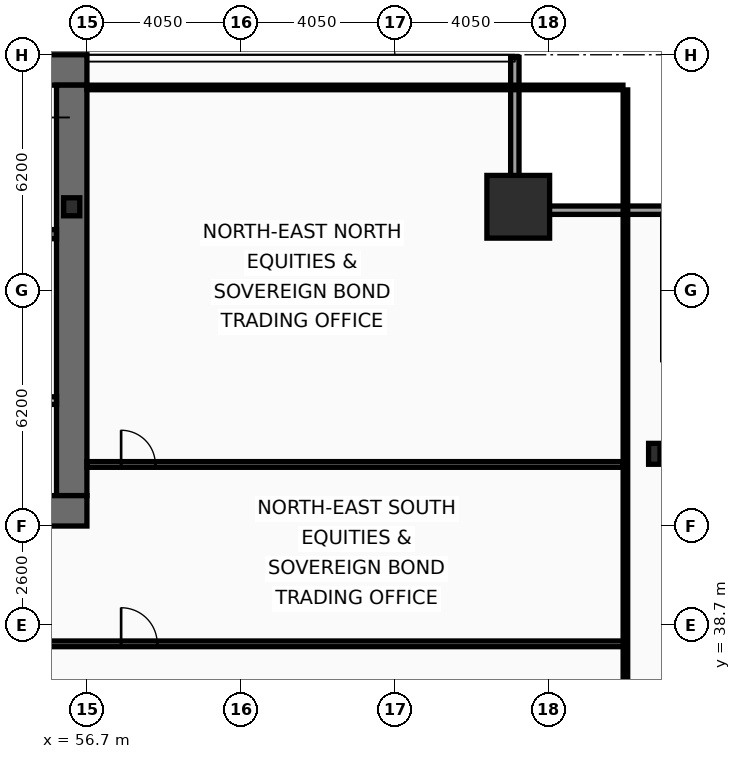
"""IFC4 building model, lengths in metres.
Left out: names, types, materials, properties, quantities, classifications, styles, units other than length and angle.
Written with IfcOpenShell. Run it as: python <this file> out.ifc"""

import sys

from ifc_helpers import new_model, si_unit, direction, frame, frame_2d, origin, origin_2d, place, context, subcontext, project, spatial, rectangle, hollow_rectangle, i_section, extrude, element, fill, save


model = new_model("IFC4")
c1 = context("Model", 3, precision=1e-05, world=origin(), true_north=direction((0.0, 1.0)))
c2 = subcontext(c1, "Body", "Model", "MODEL_VIEW")
j1 = project(units=[si_unit("LENGTHUNIT", "METRE"), si_unit("PLANEANGLEUNIT", "RADIAN")], contexts=[c1])
p1 = place(None, origin())
s1 = spatial("IfcSite", under=j1, at=p1, CompositionType="ELEMENT")
p2 = place(p1, origin())
s2 = spatial("IfcBuilding", under=s1, at=p2, CompositionType="ELEMENT")
p3 = place(p2, frame((0.0, 0.0, 33.8)))
s3 = spatial("IfcBuildingStorey", under=s2, at=p3, CompositionType="ELEMENT", Elevation=33.8)
p4 = place(p3, frame((16.2, 53.3, 0.0), z_axis=(0.0, 0.0, 1.0), x_axis=(1.0, 0.0, 0.0)))
e1 = element("IfcWall", 1, at=p4, inside=s3, PredefinedType="SHEAR", context=c2, shape_type="SweptSolid", body=[
    extrude(rectangle(XDim=40.5, YDim=0.8, at=frame_2d((20.25, 0.0))), origin(), (0.0, 0.0, 1.0), 3.82),
])
p5 = place(p3, frame((56.3, 52.9, 0.0), z_axis=(0.0, 0.0, 1.0), x_axis=(0.0, -1.0, 0.0)))
e2 = element("IfcWall", 2, at=p5, inside=s3, PredefinedType="SHEAR", context=c2, shape_type="SweptSolid", body=[
    extrude(rectangle(XDim=10.8, YDim=0.8, at=frame_2d((5.4, 0.0))), origin(), (0.0, 0.0, 1.0), 3.82),
])
p6 = place(p3, frame((56.7, 41.7, 0.0), z_axis=(0.0, 0.0, 1.0), x_axis=(-1.0, 0.0, 0.0)))
e3 = element("IfcWall", 3, at=p6, inside=s3, PredefinedType="SHEAR", context=c2, shape_type="SweptSolid", body=[
    extrude(rectangle(XDim=2.45, YDim=0.8, at=frame_2d((1.225, 0.0))), origin(), (0.0, 0.0, 1.0), 3.82),
])
p7 = place(p3, frame((48.63, 48.98, 0.0), z_axis=(0.0, 0.0, 1.0), x_axis=(1.0, 0.0, 0.0)))
e4 = element("IfcWall", 4, at=p7, inside=s3, PredefinedType="SHEAR", context=c2, shape_type="SweptSolid", body=[
    extrude(rectangle(XDim=7.27, YDim=0.24, at=frame_2d((3.635, 0.0))), origin(), (0.0, 0.0, 1.0), 3.82),
])
p8 = place(p7, frame((6.0, 0.0, 0.0)))
e5 = element("IfcOpeningElement", 5, at=p8, cuts=e4, PredefinedType="OPENING", context=c2, shape_type="SweptSolid", body=[
    extrude(rectangle(XDim=1.05, YDim=2.15, at=frame_2d((0.525, 1.075))), frame((0.0, 0.13, 0.0), z_axis=(0.0, -1.0, 0.0), x_axis=(1.0, 0.0, 0.0)), (0.0, 0.0, 1.0), 0.26),
])
p9 = place(p3, frame((68.05, 49.7, 0.0), z_axis=(0.0, 0.0, 1.0), x_axis=(1.0, 0.0, 0.0)))
e6 = element("IfcColumn", 6, at=p9, inside=s3, PredefinedType="COLUMN", context=c2, shape_type="SweptSolid", body=[
    extrude(hollow_rectangle(XDim=1.65, YDim=1.65, WallThickness=0.075, at=origin_2d()), origin(), (0.0, 0.0, 1.0), 4.0),
])
p10 = place(p3, frame((71.63, 43.2, 0.0), z_axis=(0.0, 0.0, 1.0), x_axis=(1.0, 0.0, 0.0)))
e7 = element("IfcColumn", 7, at=p10, inside=s3, PredefinedType="COLUMN", context=c2, shape_type="SweptSolid", body=[
    extrude(i_section(OverallWidth=0.3, OverallDepth=0.55, WebThickness=0.015, FlangeThickness=0.029, at=origin_2d()), origin(), (0.0, 0.0, 1.0), 4.0),
])
p11 = place(p3, frame((56.3, 49.7, 0.0), z_axis=(0.0, 0.0, 1.0), x_axis=(1.0, 0.0, 0.0)))
e8 = element("IfcColumn", 8, at=p11, inside=s3, PredefinedType="COLUMN", context=c2, shape_type="SweptSolid", body=[
    extrude(i_section(OverallWidth=0.424, OverallDepth=0.474, WebThickness=0.048, FlangeThickness=0.077, at=origin_2d()), origin(), (0.0, 0.0, 1.0), 4.0),
])
p12 = place(p3, frame((67.96, 53.63, 0.0), z_axis=(0.0, 0.0, 1.0), x_axis=(0.0, -1.0, 0.0)))
e9 = element("IfcWall", 9, at=p12, inside=s3, PredefinedType="SOLIDWALL", context=c2, shape_type="SweptSolid", body=[
    extrude(rectangle(XDim=3.91, YDim=0.22, at=frame_2d((1.955, 0.0))), origin(), (0.0, 0.0, 1.0), 3.16),
])
p13 = place(p3, frame((67.85, 49.61, 0.0), z_axis=(0.0, 0.0, 1.0), x_axis=(1.0, 0.0, 0.0)))
e10 = element("IfcWall", 10, at=p13, inside=s3, PredefinedType="SOLIDWALL", context=c2, shape_type="SweptSolid", body=[
    extrude(rectangle(XDim=4.22, YDim=0.22, at=frame_2d((2.11, 0.0))), origin(), (0.0, 0.0, 1.0), 3.16),
])
p14 = place(p3, frame((51.9, 44.6, 0.0), z_axis=(0.0, 0.0, 1.0), x_axis=(1.0, 0.0, 0.0)))
e11 = element("IfcWall", 11, at=p14, inside=s3, PredefinedType="PARTITIONING", context=c2, shape_type="SweptSolid", body=[
    extrude(rectangle(XDim=4.0, YDim=0.2, at=frame_2d((2.0, 0.0))), origin(), (0.0, 0.0, 1.0), 3.82),
])
p15 = place(p14, frame((1.15, 0.0, 0.0)))
e12 = element("IfcOpeningElement", 12, at=p15, cuts=e11, PredefinedType="OPENING", context=c2, shape_type="SweptSolid", body=[
    extrude(rectangle(XDim=1.05, YDim=2.15, at=frame_2d((0.525, 1.075))), frame((0.0, 0.11, 0.0), z_axis=(0.0, -1.0, 0.0), x_axis=(1.0, 0.0, 0.0)), (0.0, 0.0, 1.0), 0.22),
])
p16 = place(p3, frame((54.35, 38.2, 0.0), z_axis=(0.0, 0.0, 1.0), x_axis=(1.0, 0.0, 0.0)))
e13 = element("IfcWall", 13, at=p16, inside=s3, PredefinedType="PARTITIONING", context=c2, shape_type="SweptSolid", body=[
    extrude(rectangle(XDim=16.52, YDim=0.15, at=frame_2d((8.26, 0.0))), origin(), (0.0, 0.0, 1.0), 3.01),
])
p17 = place(p16, frame((3.25, 0.0, 0.0)))
e14 = element("IfcOpeningElement", 14, at=p17, cuts=e13, PredefinedType="OPENING", context=c2, shape_type="SweptSolid", body=[
    extrude(rectangle(XDim=0.95, YDim=2.05, at=frame_2d((0.475, 1.025))), frame((0.0, 0.085, 0.0), z_axis=(0.0, -1.0, 0.0), x_axis=(1.0, 0.0, 0.0)), (0.0, 0.0, 1.0), 0.17),
])
p18 = place(p3, frame((56.7, 42.92, 0.0), z_axis=(0.0, 0.0, 1.0), x_axis=(1.0, 0.0, 0.0)))
e15 = element("IfcWall", 15, at=p18, inside=s3, PredefinedType="PARTITIONING", context=c2, shape_type="SweptSolid", body=[
    extrude(rectangle(XDim=14.105, YDim=0.15, at=frame_2d((7.052, 0.0))), origin(), (0.0, 0.0, 1.0), 3.01),
])
p19 = place(p18, frame((0.9, 0.0, 0.0)))
e16 = element("IfcOpeningElement", 16, at=p19, cuts=e15, PredefinedType="OPENING", context=c2, shape_type="SweptSolid", body=[
    extrude(rectangle(XDim=0.9, YDim=2.05, at=frame_2d((0.45, 1.025))), frame((0.0, 0.085, 0.0), z_axis=(0.0, -1.0, 0.0), x_axis=(1.0, 0.0, 0.0)), (0.0, 0.0, 1.0), 0.17),
])
p20 = place(p3, frame((70.87, 10.665, 0.0), z_axis=(0.0, 0.0, 1.0), x_axis=(0.0, 1.0, 0.0)))
e17 = element("IfcWall", 17, at=p20, inside=s3, PredefinedType="PARTITIONING", context=c2, shape_type="SweptSolid", body=[
    extrude(rectangle(XDim=42.11, YDim=0.12, at=frame_2d((21.055, 0.0))), origin(), (0.0, 0.0, 1.0), 3.01),
])
p21 = place(p3, frame((56.7, 52.84, 0.0), z_axis=(0.0, 0.0, 1.0), x_axis=(1.0, 0.0, 0.0)))
e18 = element("IfcWall", 18, at=p21, inside=s3, PredefinedType="PARTITIONING", context=c2, shape_type="SweptSolid", body=[
    extrude(rectangle(XDim=14.105, YDim=0.12, at=frame_2d((7.052, 0.0))), origin(), (0.0, 0.0, 1.0), 3.82),
])
p22 = place(p17, origin())
e19 = element("IfcDoor", 19, at=p22, inside=s3, OperationType="SINGLE_SWING_LEFT", PredefinedType="DOOR", context=c2, shape_type="SweptSolid", body=[
    extrude(rectangle(XDim=0.95, YDim=2.05, at=frame_2d((0.475, 1.025))), frame((0.0, 0.025, 0.0), z_axis=(0.0, -1.0, 0.0), x_axis=(1.0, 0.0, 0.0)), (0.0, 0.0, 1.0), 0.05),
])
fill(e14, e19)
p23 = place(p19, origin())
e20 = element("IfcDoor", 20, at=p23, inside=s3, OperationType="SINGLE_SWING_LEFT", PredefinedType="DOOR", context=c2, shape_type="SweptSolid", body=[
    extrude(rectangle(XDim=0.9, YDim=2.05, at=frame_2d((0.45, 1.025))), frame((0.0, 0.025, 0.0), z_axis=(0.0, -1.0, 0.0), x_axis=(1.0, 0.0, 0.0)), (0.0, 0.0, 1.0), 0.05),
])
fill(e16, e20)
save(model, sys.argv[1])
